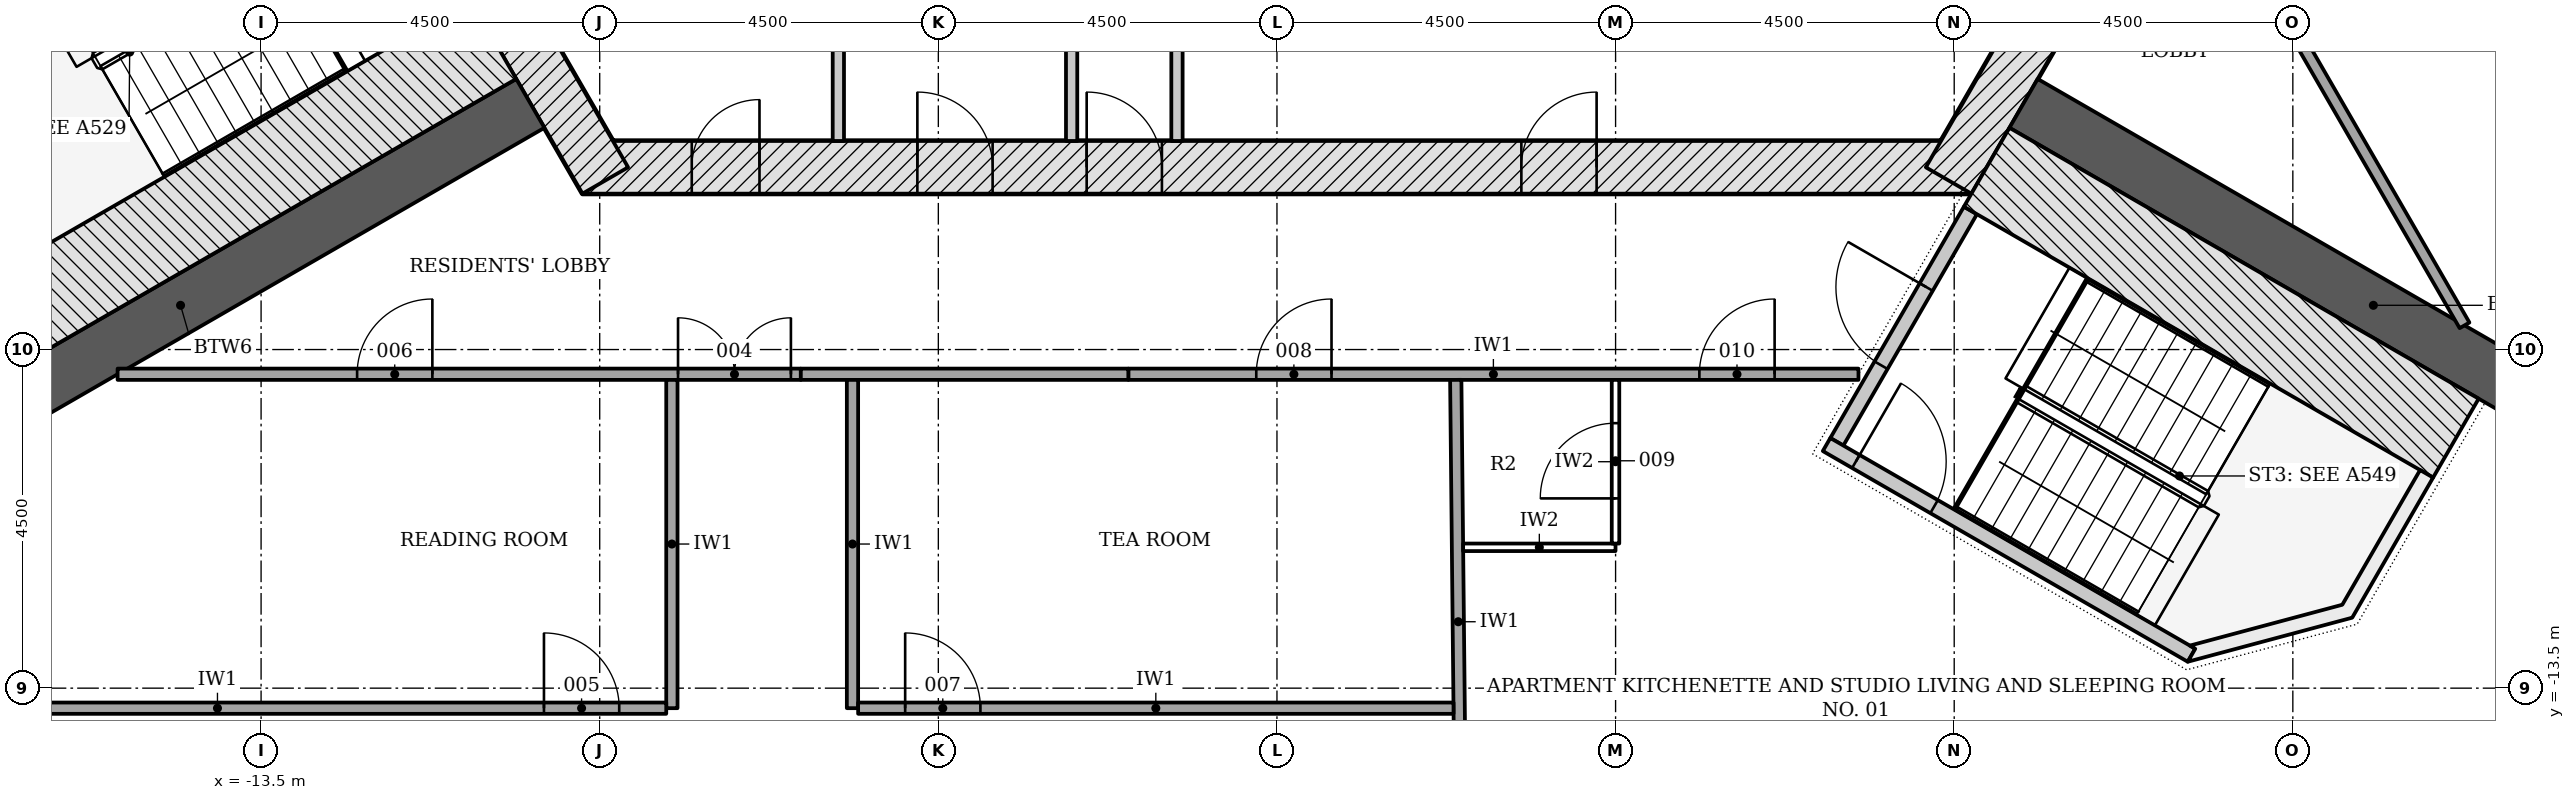
"""IFC4 building model, lengths in metres.
Left out: names, types, materials, properties, quantities, classifications, styles, units other than length and angle.
Written with IfcOpenShell. Run it as: python <this file> out.ifc"""

import sys

from ifc_helpers import new_model, si_unit, direction, frame, frame_2d, origin, place, context, subcontext, project, spatial, polyline, rectangle, outline, extrude, element, fill, save


model = new_model("IFC4")
c1 = context("Model", 3, precision=1e-05, world=origin(), true_north=direction((0.0, 1.0)))
c2 = subcontext(c1, "Body", "Model", "MODEL_VIEW")
j1 = project(units=[si_unit("LENGTHUNIT", "METRE"), si_unit("PLANEANGLEUNIT", "RADIAN")], contexts=[c1])
p1 = place(None, origin())
s1 = spatial("IfcSite", under=j1, at=p1, CompositionType="ELEMENT")
p2 = place(p1, origin())
s2 = spatial("IfcBuilding", under=s1, at=p2, CompositionType="ELEMENT")
p3 = place(p2, frame((0.0, 0.0, 150.9)))
s3 = spatial("IfcBuildingStorey", under=s2, at=p3, CompositionType="ELEMENT", Elevation=150.9)
p4 = place(p3, frame((-9.229, -6.578, -0.2), z_axis=(0.0, 0.0, 1.0), x_axis=(1.0, 0.0, 0.0)))
e1 = element("IfcWall", 1, at=p4, inside=s3, PredefinedType="SHEAR", context=c2, shape_type="SweptSolid", body=[
    extrude(rectangle(XDim=18.458, YDim=0.7, at=frame_2d((9.229, 0.0))), origin(), (0.0, 0.0, 1.0), 3.6),
])
p5 = place(p4, frame((6.7, 0.0, 0.2)))
e2 = element("IfcOpeningElement", 2, at=p5, cuts=e1, PredefinedType="OPENING", context=c2, shape_type="SweptSolid", body=[
    extrude(rectangle(XDim=1.0, YDim=2.1, at=frame_2d((0.5, 1.05))), frame((0.0, 0.36, 0.0), z_axis=(0.0, -1.0, 0.0), x_axis=(1.0, 0.0, 0.0)), (0.0, 0.0, 1.0), 0.72),
])
p6 = place(p4, frame((1.452, 0.0, 0.2)))
e3 = element("IfcOpeningElement", 3, at=p6, cuts=e1, PredefinedType="OPENING", context=c2, shape_type="SweptSolid", body=[
    extrude(rectangle(XDim=0.9, YDim=2.1, at=frame_2d((0.45, 1.05))), frame((0.0, 0.36, 0.0), z_axis=(0.0, -1.0, 0.0), x_axis=(1.0, 0.0, 0.0)), (0.0, 0.0, 1.0), 0.72),
])
p7 = place(p4, frame((4.45, 0.0, 0.2)))
e4 = element("IfcOpeningElement", 4, at=p7, cuts=e1, PredefinedType="OPENING", context=c2, shape_type="SweptSolid", body=[
    extrude(rectangle(XDim=1.0, YDim=2.1, at=frame_2d((0.5, 1.05))), frame((0.0, 0.36, 0.0), z_axis=(0.0, -1.0, 0.0), x_axis=(1.0, 0.0, 0.0)), (0.0, 0.0, 1.0), 0.72),
])
p8 = place(p4, frame((12.477, 0.0, 0.2)))
e5 = element("IfcOpeningElement", 5, at=p8, cuts=e1, PredefinedType="OPENING", context=c2, shape_type="SweptSolid", body=[
    extrude(rectangle(XDim=1.0, YDim=2.1, at=frame_2d((0.5, 1.05))), frame((0.0, 0.36, 0.0), z_axis=(0.0, -1.0, 0.0), x_axis=(1.0, 0.0, 0.0)), (0.0, 0.0, 1.0), 0.72),
])
for number, where, z_axis, x_axis in (
    (6, (8.926, -6.753, -0.2), (0.0, 0.0, 1.0), (0.5, 0.866, 0.0)),
    (7, (-10.311, -4.353, -0.2), (0.0, 0.0, 1.0), (0.5, -0.866, 0.0)),
):
    element("IfcWall", number, at=place(p3, frame(where, z_axis=z_axis, x_axis=x_axis)), inside=s3, PredefinedType="SHEAR", context=c2, shape_type="SweptSolid", body=[
        extrude(rectangle(XDim=2.771, YDim=0.7, at=frame_2d((1.386, 0.0))), origin(), (0.0, 0.0, 1.0), 3.6),
    ])
for number, where, z_axis, x_axis in (
    (8, (-9.922, -5.728, -0.2), (0.0, 0.0, 1.0), (-0.866, -0.5, 0.0)),
    (9, (9.922, -5.728, -0.2), (0.0, 0.0, 1.0), (0.866, -0.5, 0.0)),
):
    element("IfcWall", number, at=place(p3, frame(where, z_axis=z_axis, x_axis=x_axis)), inside=s3, PredefinedType="SHEAR", context=c2, shape_type="SweptSolid", body=[
        extrude(rectangle(XDim=10.735, YDim=0.75, at=frame_2d((5.368, 0.0))), origin(), (0.0, 0.0, 1.0), 3.6),
    ])
p9 = place(p3, origin())
e10 = element("IfcWall", 10, at=p9, inside=s3, PredefinedType="NOTDEFINED", context=c2, shape_type="SweptSolid", body=[
    extrude(outline(polyline([(-21.704, -5.64), (-23.061, -8.494), (-23.472, -9.826), (-23.507, -11.219), (-23.163, -12.569), (-22.466, -13.775), (-21.469, -14.748), (-20.245, -15.414), (-18.887, -15.724), (-15.736, -15.976), (-15.712, -15.677), (-18.841, -15.427), (-20.138, -15.131), (-21.289, -14.504), (-22.227, -13.589), (-22.882, -12.455), (-23.206, -11.185), (-23.173, -9.875), (-22.781, -8.604), (-21.433, -5.769), (-21.704, -5.64)])), origin(), (0.0, 0.0, 1.0), 3.3),
])
p10 = place(p3, origin())
e11 = element("IfcWall", 11, at=p10, inside=s3, PredefinedType="NOTDEFINED", context=c2, shape_type="SweptSolid", body=[
    extrude(outline(polyline([(15.736, -15.976), (18.887, -15.724), (20.245, -15.414), (21.469, -14.748), (22.466, -13.775), (23.163, -12.569), (23.507, -11.219), (23.472, -9.826), (23.061, -8.494), (21.704, -5.64), (21.433, -5.769), (22.781, -8.604), (23.173, -9.875), (23.206, -11.185), (22.882, -12.455), (22.227, -13.589), (21.289, -14.504), (20.138, -15.131), (18.841, -15.427), (15.712, -15.677), (15.736, -15.976)])), origin(), (0.0, 0.0, 1.0), 3.3),
])
p11 = place(p3, frame((-5.829, -3.492, 0.0), z_axis=(0.0, 0.0, 1.0), x_axis=(0.0, -1.0, 0.0)))
e12 = element("IfcWall", 12, at=p11, inside=s3, PredefinedType="PARTITIONING", context=c2, shape_type="SweptSolid", body=[
    extrude(rectangle(XDim=2.736, YDim=0.15, at=frame_2d((1.368, 0.0))), origin(), (0.0, 0.0, 1.0), 3.4),
])
p12 = place(p3, frame((-2.729, 1.3, 0.0), z_axis=(0.0, 0.0, 1.0), x_axis=(0.0, -1.0, 0.0)))
e13 = element("IfcWall", 13, at=p12, inside=s3, PredefinedType="PARTITIONING", context=c2, shape_type="SweptSolid", body=[
    extrude(rectangle(XDim=7.528, YDim=0.15, at=frame_2d((3.764, 0.0))), origin(), (0.0, 0.0, 1.0), 3.4),
])
p13 = place(p12, frame((1.915, 0.0, 0.0)))
e14 = element("IfcOpeningElement", 14, at=p13, cuts=e13, PredefinedType="OPENING", context=c2, shape_type="SweptSolid", body=[
    extrude(rectangle(XDim=0.9, YDim=2.1, at=frame_2d((0.45, 1.05))), frame((0.0, 0.085, 0.0), z_axis=(0.0, -1.0, 0.0), x_axis=(1.0, 0.0, 0.0)), (0.0, 0.0, 1.0), 0.17),
])
p14 = place(p3, frame((-1.329, 1.597, 0.0), z_axis=(0.0, 0.0, 1.0), x_axis=(0.0, -1.0, 0.0)))
e15 = element("IfcWall", 15, at=p14, inside=s3, PredefinedType="PARTITIONING", context=c2, shape_type="SweptSolid", body=[
    extrude(rectangle(XDim=7.825, YDim=0.15, at=frame_2d((3.913, 0.0))), origin(), (0.0, 0.0, 1.0), 3.4),
])
p15 = place(p14, frame((2.063, 0.0, 0.0)))
e16 = element("IfcOpeningElement", 16, at=p15, cuts=e15, PredefinedType="OPENING", context=c2, shape_type="SweptSolid", body=[
    extrude(rectangle(XDim=0.9, YDim=2.1, at=frame_2d((0.45, 1.05))), frame((0.0, 0.085, 0.0), z_axis=(0.0, -1.0, 0.0), x_axis=(1.0, 0.0, 0.0)), (0.0, 0.0, 1.0), 0.17),
])
p16 = place(p3, frame((-10.412, -4.879, -0.2), z_axis=(0.0, 0.0, 1.0), x_axis=(-0.866026919366, -0.499997374926, 0.0)))
e17 = element("IfcWall", 17, at=p16, inside=s3, PredefinedType="SHEAR", context=c2, shape_type="SweptSolid", body=[
    extrude(rectangle(XDim=7.2, YDim=1.211, at=frame_2d((3.6, 0.0))), origin(), (0.0, 0.0, 1.0), 3.6),
])
p17 = place(p3, frame((7.44, -10.226, -0.2), z_axis=(0.0, 0.0, 1.0), x_axis=(0.500022077904, 0.866012656725, 0.0)))
e18 = element("IfcWall", 18, at=p17, inside=s3, PredefinedType="SHEAR", context=c2, shape_type="SweptSolid", body=[
    extrude(rectangle(XDim=3.55, YDim=0.2, at=frame_2d((1.775, 0.0))), origin(), (0.0, 0.0, 1.0), 3.6),
])
p18 = place(p17, frame((1.175, 0.0, 0.2)))
e19 = element("IfcOpeningElement", 19, at=p18, cuts=e18, PredefinedType="OPENING", context=c2, shape_type="SweptSolid", body=[
    extrude(rectangle(XDim=1.2, YDim=2.1, at=frame_2d((0.6, 1.05))), frame((0.0, 0.11, 0.0), z_axis=(0.0, -1.0, 0.0), x_axis=(1.0, 0.0, 0.0)), (0.0, 0.0, 1.0), 0.22),
])
p19 = place(p3, frame((7.304, -10.262, -0.2), z_axis=(0.0, 0.0, 1.0), x_axis=(0.866026594901, -0.49999793692, 0.0)))
e20 = element("IfcWall", 20, at=p19, inside=s3, PredefinedType="SHEAR", context=c2, shape_type="SweptSolid", body=[
    extrude(rectangle(XDim=5.6, YDim=0.2, at=frame_2d((2.8, 0.0))), origin(), (0.0, 0.0, 1.0), 3.6),
])
p20 = place(p19, frame((0.45, 0.0, 0.2)))
e21 = element("IfcOpeningElement", 21, at=p20, cuts=e20, PredefinedType="OPENING", context=c2, shape_type="SweptSolid", body=[
    extrude(rectangle(XDim=1.2, YDim=2.1, at=frame_2d((0.6, 1.05))), frame((0.0, 0.11, 0.0), z_axis=(0.0, -1.0, 0.0), x_axis=(1.0, 0.0, 0.0)), (0.0, 0.0, 1.0), 0.22),
])
p21 = place(p3, frame((9.431, -6.577, -0.2), z_axis=(0.0, 0.0, 1.0), x_axis=(0.866018442252, -0.500012057535, 0.0)))
e22 = element("IfcWall", 22, at=p21, inside=s3, PredefinedType="SHEAR", context=c2, shape_type="SweptSolid", body=[
    extrude(rectangle(XDim=7.2, YDim=1.211, at=frame_2d((3.6, 0.0))), origin(), (0.0, 0.0, 1.0), 3.6),
])
p22 = place(p3, frame((0.0, 0.0, -0.2)))
e23 = element("IfcWall", 23, at=p22, inside=s3, PredefinedType="SHEAR", context=c2, shape_type="SweptSolid", body=[
    extrude(outline(polyline([(12.104, -13.149), (14.289, -12.563), (15.364, -10.701), (15.191, -10.601), (14.157, -12.392), (12.132, -12.934), (12.204, -12.976), (12.204, -12.976), (12.204, -12.976), (12.204, -12.976), (12.204, -12.976), (12.204, -12.976), (12.204, -12.976), (12.204, -12.976), (12.204, -12.976), (12.204, -12.976), (12.204, -12.976), (12.204, -12.976), (12.204, -12.976), (12.204, -12.976), (12.204, -12.976), (12.204, -12.976), (12.204, -12.976), (12.104, -13.149)])), origin(), (0.0, 0.0, 1.0), 3.6),
])
p23 = place(p3, frame((15.782, -8.679, 0.0), z_axis=(0.0, 0.0, 1.0), x_axis=(-0.500005644317, 0.866022145012, 0.0)))
e24 = element("IfcWall", 24, at=p23, inside=s3, PredefinedType="PARTITIONING", context=c2, shape_type="SweptSolid", body=[
    extrude(rectangle(XDim=9.08, YDim=0.15, at=frame_2d((4.54, 0.0))), origin(), (0.0, 0.0, 1.0), 2.847),
])
p24 = place(p3, frame((-15.407, -9.328, 0.0), z_axis=(0.0, 0.0, 1.0), x_axis=(1.0, 0.0, 0.0)))
e25 = element("IfcWall", 25, at=p24, inside=s3, PredefinedType="PARTITIONING", context=c2, shape_type="SweptSolid", body=[
    extrude(rectangle(XDim=9.079, YDim=0.15, at=frame_2d((4.54, 0.0))), origin(), (0.0, 0.0, 1.0), 2.847),
])
p25 = place(p24, frame((7.448, 0.0, 0.0)))
e26 = element("IfcOpeningElement", 26, at=p25, cuts=e25, PredefinedType="OPENING", context=c2, shape_type="SweptSolid", body=[
    extrude(rectangle(XDim=1.5, YDim=2.1, at=frame_2d((0.75, 1.05))), frame((0.0, 0.085, 0.0), z_axis=(0.0, -1.0, 0.0), x_axis=(1.0, 0.0, 0.0)), (0.0, 0.0, 1.0), 0.17),
])
p26 = place(p24, frame((3.183, 0.0, 0.0)))
e27 = element("IfcOpeningElement", 27, at=p26, cuts=e25, PredefinedType="OPENING", context=c2, shape_type="SweptSolid", body=[
    extrude(rectangle(XDim=1.0, YDim=2.1, at=frame_2d((0.5, 1.05))), frame((0.0, 0.085, 0.0), z_axis=(0.0, -1.0, 0.0), x_axis=(1.0, 0.0, 0.0)), (0.0, 0.0, 1.0), 0.17),
])
p27 = place(p3, frame((-1.975, -9.328, 0.0), z_axis=(0.0, 0.0, 1.0), x_axis=(1.0, 0.0, 0.0)))
e28 = element("IfcWall", 28, at=p27, inside=s3, PredefinedType="PARTITIONING", context=c2, shape_type="SweptSolid", body=[
    extrude(rectangle(XDim=9.703, YDim=0.15, at=frame_2d((4.852, 0.0))), origin(), (0.0, 0.0, 1.0), 2.847),
])
p28 = place(p27, frame((1.7, 0.0, 0.0)))
e29 = element("IfcOpeningElement", 29, at=p28, cuts=e28, PredefinedType="OPENING", context=c2, shape_type="SweptSolid", body=[
    extrude(rectangle(XDim=1.0, YDim=2.1, at=frame_2d((0.5, 1.05))), frame((0.0, 0.085, 0.0), z_axis=(0.0, -1.0, 0.0), x_axis=(1.0, 0.0, 0.0)), (0.0, 0.0, 1.0), 0.17),
])
p29 = place(p27, frame((7.589, 0.0, 0.0)))
e30 = element("IfcOpeningElement", 30, at=p29, cuts=e28, PredefinedType="OPENING", context=c2, shape_type="SweptSolid", body=[
    extrude(rectangle(XDim=1.0, YDim=2.1, at=frame_2d((0.5, 1.05))), frame((0.0, 0.085, 0.0), z_axis=(0.0, -1.0, 0.0), x_axis=(1.0, 0.0, 0.0)), (0.0, 0.0, 1.0), 0.17),
])
p30 = place(p3, frame((-6.328, -9.328, 0.0), z_axis=(0.0, 0.0, 1.0), x_axis=(1.0, 0.0, 0.0)))
e31 = element("IfcWall", 31, at=p30, inside=s3, PredefinedType="PARTITIONING", context=c2, shape_type="SweptSolid", body=[
    extrude(rectangle(XDim=4.352, YDim=0.15, at=frame_2d((2.176, 0.0))), origin(), (0.0, 0.0, 1.0), 2.847),
])
p31 = place(p3, frame((2.443, -15.831, 0.0), z_axis=(0.0, 0.0, 1.0), x_axis=(-0.010368237525, 0.999946248381, 0.0)))
e32 = element("IfcWall", 32, at=p31, inside=s3, PredefinedType="PARTITIONING", context=c2, shape_type="SweptSolid", body=[
    extrude(rectangle(XDim=6.428, YDim=0.15, at=frame_2d((3.214, 0.0))), origin(), (0.0, 0.0, 1.0), 3.4),
])
for number, where, z_axis, x_axis in (
    (33, (-8.041, -9.403, 0.0), (0.0, 0.0, 1.0), (0.0, -1.0, 0.0)),
    (34, (-5.641, -9.403, 0.0), (0.0, 0.0, 1.0), (0.0, -1.0, 0.0)),
):
    element("IfcWall", number, at=place(p3, frame(where, z_axis=z_axis, x_axis=x_axis)), inside=s3, PredefinedType="PARTITIONING", context=c2, shape_type="SweptSolid", body=[
        extrude(rectangle(XDim=4.363, YDim=0.15, at=frame_2d((2.181, 0.0))), origin(), (0.0, 0.0, 1.0), 3.4),
    ])
p32 = place(p3, frame((-20.043, -13.766, 0.0), z_axis=(0.0, 0.0, 1.0), x_axis=(1.0, 0.0, 0.0)))
e35 = element("IfcWall", 35, at=p32, inside=s3, PredefinedType="PARTITIONING", context=c2, shape_type="SweptSolid", body=[
    extrude(rectangle(XDim=11.927, YDim=0.15, at=frame_2d((5.964, 0.0))), origin(), (0.0, 0.0, 1.0), 2.847),
])
p33 = place(p32, frame((10.303, 0.0, 0.0)))
e36 = element("IfcOpeningElement", 36, at=p33, cuts=e35, PredefinedType="OPENING", context=c2, shape_type="SweptSolid", body=[
    extrude(rectangle(XDim=1.0, YDim=2.1, at=frame_2d((0.5, 1.05))), frame((0.0, 0.085, 0.0), z_axis=(0.0, -1.0, 0.0), x_axis=(1.0, 0.0, 0.0)), (0.0, 0.0, 1.0), 0.17),
])
p34 = place(p3, frame((-5.566, -13.766, 0.0), z_axis=(0.0, 0.0, 1.0), x_axis=(1.0, 0.0, 0.0)))
e37 = element("IfcWall", 37, at=p34, inside=s3, PredefinedType="PARTITIONING", context=c2, shape_type="SweptSolid", body=[
    extrude(rectangle(XDim=7.912, YDim=0.15, at=frame_2d((3.956, 0.0))), origin(), (0.0, 0.0, 1.0), 2.847),
])
p35 = place(p34, frame((0.625, 0.0, 0.0)))
e38 = element("IfcOpeningElement", 38, at=p35, cuts=e37, PredefinedType="OPENING", context=c2, shape_type="SweptSolid", body=[
    extrude(rectangle(XDim=1.0, YDim=2.1, at=frame_2d((0.5, 1.05))), frame((0.0, 0.085, 0.0), z_axis=(0.0, -1.0, 0.0), x_axis=(1.0, 0.0, 0.0)), (0.0, 0.0, 1.0), 0.17),
])
p36 = place(p3, frame((2.474, -11.628, 0.0), z_axis=(0.0, 0.0, 1.0), x_axis=(1.0, 0.0, 0.0)))
e39 = element("IfcWall", 39, at=p36, inside=s3, PredefinedType="PARTITIONING", context=c2, shape_type="SweptSolid", body=[
    extrude(rectangle(XDim=2.025, YDim=0.1, at=frame_2d((1.012, 0.0))), origin(), (0.0, 0.0, 1.0), 3.4),
])
p37 = place(p3, frame((4.499, -11.578, 0.0), z_axis=(0.0, 0.0, 1.0), x_axis=(0.0, 1.0, 0.0)))
e40 = element("IfcWall", 40, at=p37, inside=s3, PredefinedType="PARTITIONING", context=c2, shape_type="SweptSolid", body=[
    extrude(rectangle(XDim=2.175, YDim=0.1, at=frame_2d((1.087, 0.0))), origin(), (0.0, 0.0, 1.0), 3.4),
])
p38 = place(p37, frame((0.6, 0.0, 0.0)))
e41 = element("IfcOpeningElement", 41, at=p38, cuts=e40, PredefinedType="OPENING", context=c2, shape_type="SweptSolid", body=[
    extrude(rectangle(XDim=1.0, YDim=2.1, at=frame_2d((0.5, 1.05))), frame((0.0, 0.06, 0.0), z_axis=(0.0, -1.0, 0.0), x_axis=(1.0, 0.0, 0.0)), (0.0, 0.0, 1.0), 0.12),
])
p39 = place(p5, origin())
e42 = element("IfcDoor", 42, at=p39, inside=s3, OperationType="SINGLE_SWING_LEFT", PredefinedType="DOOR", context=c2, shape_type="SweptSolid", body=[
    extrude(rectangle(XDim=1.0, YDim=2.1, at=frame_2d((0.5, 1.05))), frame((0.0, 0.075, 0.0), z_axis=(0.0, -1.0, 0.0), x_axis=(1.0, 0.0, 0.0)), (0.0, 0.0, 1.0), 0.15),
])
fill(e2, e42)
p40 = place(p6, origin())
e43 = element("IfcDoor", 43, at=p40, inside=s3, OperationType="SINGLE_SWING_RIGHT", PredefinedType="DOOR", context=c2, shape_type="SweptSolid", body=[
    extrude(rectangle(XDim=0.9, YDim=2.1, at=frame_2d((0.45, 1.05))), frame((0.0, 0.075, 0.0), z_axis=(0.0, -1.0, 0.0), x_axis=(1.0, 0.0, 0.0)), (0.0, 0.0, 1.0), 0.15),
])
fill(e3, e43)
p41 = place(p7, origin())
e44 = element("IfcDoor", 44, at=p41, inside=s3, OperationType="SINGLE_SWING_LEFT", PredefinedType="DOOR", context=c2, shape_type="SweptSolid", body=[
    extrude(rectangle(XDim=1.0, YDim=2.1, at=frame_2d((0.5, 1.05))), frame((0.0, 0.075, 0.0), z_axis=(0.0, -1.0, 0.0), x_axis=(1.0, 0.0, 0.0)), (0.0, 0.0, 1.0), 0.15),
])
fill(e4, e44)
p42 = place(p8, origin())
e45 = element("IfcDoor", 45, at=p42, inside=s3, OperationType="SINGLE_SWING_RIGHT", PredefinedType="DOOR", context=c2, shape_type="SweptSolid", body=[
    extrude(rectangle(XDim=1.0, YDim=2.1, at=frame_2d((0.5, 1.05))), frame((0.0, 0.075, 0.0), z_axis=(0.0, -1.0, 0.0), x_axis=(1.0, 0.0, 0.0)), (0.0, 0.0, 1.0), 0.15),
])
fill(e5, e45)
p43 = place(p18, origin())
e46 = element("IfcDoor", 46, at=p43, inside=s3, OperationType="SINGLE_SWING_RIGHT", PredefinedType="DOOR", context=c2, shape_type="SweptSolid", body=[
    extrude(rectangle(XDim=1.2, YDim=2.1, at=frame_2d((0.6, 1.05))), frame((0.0, 0.025, 0.0), z_axis=(0.0, -1.0, 0.0), x_axis=(1.0, 0.0, 0.0)), (0.0, 0.0, 1.0), 0.05),
])
fill(e19, e46)
p44 = place(p20, origin())
e47 = element("IfcDoor", 47, at=p44, inside=s3, OperationType="SINGLE_SWING_LEFT", PredefinedType="DOOR", context=c2, shape_type="SweptSolid", body=[
    extrude(rectangle(XDim=1.2, YDim=2.1, at=frame_2d((0.6, 1.05))), frame((0.0, 0.025, 0.0), z_axis=(0.0, -1.0, 0.0), x_axis=(1.0, 0.0, 0.0)), (0.0, 0.0, 1.0), 0.05),
])
fill(e21, e47)
p45 = place(p25, origin())
e48 = element("IfcDoor", 48, at=p45, inside=s3, OperationType="DOUBLE_DOOR_SINGLE_SWING", PredefinedType="DOOR", context=c2, shape_type="SweptSolid", body=[
    extrude(rectangle(XDim=1.5, YDim=2.1, at=frame_2d((0.75, 1.05))), frame((0.0, 0.025, 0.0), z_axis=(0.0, -1.0, 0.0), x_axis=(1.0, 0.0, 0.0)), (0.0, 0.0, 1.0), 0.05),
])
fill(e26, e48)
p46 = place(p33, origin())
e49 = element("IfcDoor", 49, at=p46, inside=s3, OperationType="SINGLE_SWING_LEFT", PredefinedType="DOOR", context=c2, shape_type="SweptSolid", body=[
    extrude(rectangle(XDim=1.0, YDim=2.1, at=frame_2d((0.5, 1.05))), frame((0.0, 0.025, 0.0), z_axis=(0.0, -1.0, 0.0), x_axis=(1.0, 0.0, 0.0)), (0.0, 0.0, 1.0), 0.05),
])
fill(e36, e49)
p47 = place(p26, origin())
e50 = element("IfcDoor", 50, at=p47, inside=s3, OperationType="SINGLE_SWING_RIGHT", PredefinedType="DOOR", context=c2, shape_type="SweptSolid", body=[
    extrude(rectangle(XDim=1.0, YDim=2.1, at=frame_2d((0.5, 1.05))), frame((0.0, 0.025, 0.0), z_axis=(0.0, -1.0, 0.0), x_axis=(1.0, 0.0, 0.0)), (0.0, 0.0, 1.0), 0.05),
])
fill(e27, e50)
p48 = place(p35, origin())
e51 = element("IfcDoor", 51, at=p48, inside=s3, OperationType="SINGLE_SWING_LEFT", PredefinedType="DOOR", context=c2, shape_type="SweptSolid", body=[
    extrude(rectangle(XDim=1.0, YDim=2.1, at=frame_2d((0.5, 1.05))), frame((0.0, 0.025, 0.0), z_axis=(0.0, -1.0, 0.0), x_axis=(1.0, 0.0, 0.0)), (0.0, 0.0, 1.0), 0.05),
])
fill(e38, e51)
p49 = place(p28, origin())
e52 = element("IfcDoor", 52, at=p49, inside=s3, OperationType="SINGLE_SWING_RIGHT", PredefinedType="DOOR", context=c2, shape_type="SweptSolid", body=[
    extrude(rectangle(XDim=1.0, YDim=2.1, at=frame_2d((0.5, 1.05))), frame((0.0, 0.025, 0.0), z_axis=(0.0, -1.0, 0.0), x_axis=(1.0, 0.0, 0.0)), (0.0, 0.0, 1.0), 0.05),
])
fill(e29, e52)
p50 = place(p38, origin())
e53 = element("IfcDoor", 53, at=p50, inside=s3, OperationType="SINGLE_SWING_LEFT", PredefinedType="DOOR", context=c2, shape_type="SweptSolid", body=[
    extrude(rectangle(XDim=1.0, YDim=2.1, at=frame_2d((0.5, 1.05))), frame((0.0, 0.025, 0.0), z_axis=(0.0, -1.0, 0.0), x_axis=(1.0, 0.0, 0.0)), (0.0, 0.0, 1.0), 0.05),
])
fill(e41, e53)
p51 = place(p29, origin())
e54 = element("IfcDoor", 54, at=p51, inside=s3, OperationType="SINGLE_SWING_RIGHT", PredefinedType="DOOR", context=c2, shape_type="SweptSolid", body=[
    extrude(rectangle(XDim=1.0, YDim=2.1, at=frame_2d((0.5, 1.05))), frame((0.0, 0.025, 0.0), z_axis=(0.0, -1.0, 0.0), x_axis=(1.0, 0.0, 0.0)), (0.0, 0.0, 1.0), 0.05),
])
fill(e30, e54)
save(model, sys.argv[1])
